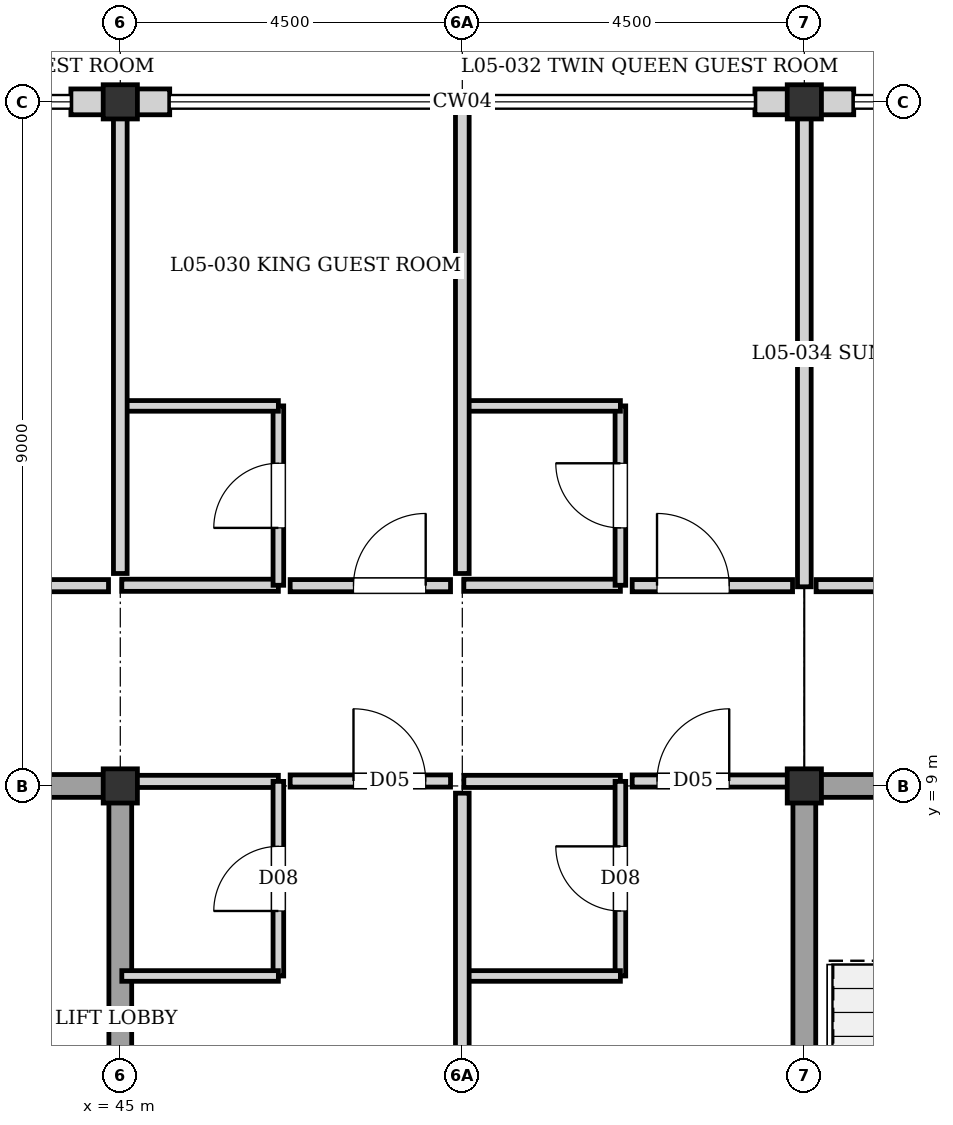
"""IFC4 building model, lengths in metres.
Left out: names, types, materials, properties, quantities, classifications, styles, units other than length and angle.
Written with IfcOpenShell. Run it as: python <this file> out.ifc"""

import sys

from ifc_helpers import new_model, si_unit, direction, frame, frame_2d, origin, origin_2d, place, context, subcontext, project, spatial, rectangle, extrude, element, fill, save


model = new_model("IFC4")
c1 = context("Model", 3, precision=1e-05, world=origin(), true_north=direction((0.0, 1.0)))
c2 = subcontext(c1, "Body", "Model", "MODEL_VIEW")
j1 = project(units=[si_unit("LENGTHUNIT", "METRE"), si_unit("PLANEANGLEUNIT", "RADIAN")], contexts=[c1])
p1 = place(None, origin())
s1 = spatial("IfcSite", under=j1, at=p1, CompositionType="ELEMENT")
p2 = place(p1, origin())
s2 = spatial("IfcBuilding", under=s1, at=p2, CompositionType="ELEMENT")
p3 = place(p2, frame((0.0, 0.0, 17.6)))
s3 = spatial("IfcBuildingStorey", under=s2, at=p3, CompositionType="ELEMENT", Elevation=17.6)
for number, where, z_axis, x_axis in (
    (1, (45.0, 9.0, 0.0), (0.0, 0.0, 1.0), (1.0, 0.0, 0.0)),
    (2, (45.0, 18.0, 0.0), (0.0, 0.0, 1.0), (1.0, 0.0, 0.0)),
    (3, (54.0, 9.0, 0.0), (0.0, 0.0, 1.0), (1.0, 0.0, 0.0)),
    (4, (54.0, 18.0, 0.0), (0.0, 0.0, 1.0), (1.0, 0.0, 0.0)),
):
    element("IfcColumn", number, at=place(p3, frame(where, z_axis=z_axis, x_axis=x_axis)), inside=s3, PredefinedType="COLUMN", context=c2, shape_type="SweptSolid", body=[
        extrude(rectangle(XDim=0.45, YDim=0.45, at=origin_2d()), origin(), (0.0, 0.0, 1.0), 3.04),
    ])
p4 = place(p3, frame((44.35, 18.0, 0.0), z_axis=(0.0, 0.0, 1.0), x_axis=(1.0, 0.0, 0.0)))
e5 = element("IfcWall", 5, at=p4, inside=s3, PredefinedType="SOLIDWALL", context=c2, shape_type="SweptSolid", body=[
    extrude(rectangle(XDim=0.65, YDim=0.34, at=frame_2d((0.325, 0.0))), origin(), (0.0, 0.0, 1.0), 2.38),
])
for number, where, z_axis, x_axis in (
    (6, (45.0, 18.0, 0.0), (0.0, 0.0, 1.0), (1.0, 0.0, 0.0)),
    (7, (53.35, 18.0, 0.0), (0.0, 0.0, 1.0), (1.0, 0.0, 0.0)),
):
    element("IfcWall", number, at=place(p3, frame(where, z_axis=z_axis, x_axis=x_axis)), inside=s3, PredefinedType="SOLIDWALL", context=c2, shape_type="SweptSolid", body=[
        extrude(rectangle(XDim=0.65, YDim=0.34, at=frame_2d((0.325, 0.0))), origin(), (0.0, 0.0, 1.0), 2.55),
    ])
p5 = place(p3, frame((54.0, 18.0, 0.0), z_axis=(0.0, 0.0, 1.0), x_axis=(1.0, 0.0, 0.0)))
e8 = element("IfcWall", 8, at=p5, inside=s3, PredefinedType="SOLIDWALL", context=c2, shape_type="SweptSolid", body=[
    extrude(rectangle(XDim=0.65, YDim=0.34, at=frame_2d((0.325, 0.0))), origin(), (0.0, 0.0, 1.0), 2.48),
])
p6 = place(p3, frame((45.0, 0.0, 0.0), z_axis=(0.0, 0.0, 1.0), x_axis=(0.0, 1.0, 0.0)))
e9 = element("IfcWall", 9, at=p6, inside=s3, PredefinedType="SHEAR", context=c2, shape_type="SweptSolid", body=[
    extrude(rectangle(XDim=9.0, YDim=0.3, at=frame_2d((4.5, 0.0))), origin(), (0.0, 0.0, 1.0), 2.82),
])
p7 = place(p3, frame((36.0, 9.0, 0.0), z_axis=(0.0, 0.0, 1.0), x_axis=(1.0, 0.0, 0.0)))
e10 = element("IfcWall", 10, at=p7, inside=s3, PredefinedType="SHEAR", context=c2, shape_type="SweptSolid", body=[
    extrude(rectangle(XDim=9.0, YDim=0.3, at=frame_2d((4.5, 0.0))), origin(), (0.0, 0.0, 1.0), 2.82),
])
p8 = place(p7, frame((5.95, 0.0, 0.0)))
e11 = element("IfcOpeningElement", 11, at=p8, cuts=e10, PredefinedType="OPENING", context=c2, shape_type="SweptSolid", body=[
    extrude(rectangle(XDim=1.6, YDim=2.1, at=frame_2d((0.8, 1.05))), frame((0.0, 0.16, 0.0), z_axis=(0.0, -1.0, 0.0), x_axis=(1.0, 0.0, 0.0)), (0.0, 0.0, 1.0), 0.32),
])
p9 = place(p3, frame((54.0, 9.0, 0.0), z_axis=(0.0, 0.0, 1.0), x_axis=(1.0, 0.0, 0.0)))
e12 = element("IfcWall", 12, at=p9, inside=s3, PredefinedType="SHEAR", context=c2, shape_type="SweptSolid", body=[
    extrude(rectangle(XDim=9.0, YDim=0.3, at=frame_2d((4.5, 0.0))), origin(), (0.0, 0.0, 1.0), 2.82),
])
p10 = place(p9, frame((6.05, 0.0, 0.0)))
e13 = element("IfcOpeningElement", 13, at=p10, cuts=e12, PredefinedType="OPENING", context=c2, shape_type="SweptSolid", body=[
    extrude(rectangle(XDim=1.4, YDim=2.02, at=frame_2d((0.7, 1.01))), frame((0.0, 0.16, 0.0), z_axis=(0.0, -1.0, 0.0), x_axis=(1.0, 0.0, 0.0)), (0.0, 0.0, 1.0), 0.32),
])
p11 = place(p3, frame((54.0, 0.0, 0.0), z_axis=(0.0, 0.0, 1.0), x_axis=(0.0, 1.0, 0.0)))
e14 = element("IfcWall", 14, at=p11, inside=s3, PredefinedType="SHEAR", context=c2, shape_type="SweptSolid", body=[
    extrude(rectangle(XDim=9.0, YDim=0.3, at=frame_2d((4.5, 0.0))), origin(), (0.0, 0.0, 1.0), 2.82),
])
p12 = place(p3, frame((45.02, 9.06, 0.0), z_axis=(0.0, 0.0, 1.0), x_axis=(1.0, 0.0, 0.0)))
e15 = element("IfcWall", 15, at=p12, inside=s3, PredefinedType="PARTITIONING", context=c2, shape_type="SweptSolid", body=[
    extrude(rectangle(XDim=2.06, YDim=0.16, at=frame_2d((1.03, 0.0))), origin(), (0.0, 0.0, 1.0), 2.38),
])
p13 = place(p3, frame((47.08, 6.5, 0.0), z_axis=(0.0, 0.0, 1.0), x_axis=(0.0, 1.0, 0.0)))
e16 = element("IfcWall", 16, at=p13, inside=s3, PredefinedType="PLUMBINGWALL", context=c2, shape_type="SweptSolid", body=[
    extrude(rectangle(XDim=2.56, YDim=0.14, at=frame_2d((1.28, 0.0))), origin(), (0.0, 0.0, 1.0), 2.82),
])
p14 = place(p13, frame((0.855, 0.0, 0.0)))
e17 = element("IfcOpeningElement", 17, at=p14, cuts=e16, PredefinedType="OPENING", context=c2, shape_type="SweptSolid", body=[
    extrude(rectangle(XDim=0.85, YDim=2.04, at=frame_2d((0.425, 1.02))), frame((0.0, 0.08, 0.0), z_axis=(0.0, -1.0, 0.0), x_axis=(1.0, 0.0, 0.0)), (0.0, 0.0, 1.0), 0.16),
])
p15 = place(p3, frame((45.02, 6.5, 0.0), z_axis=(0.0, 0.0, 1.0), x_axis=(1.0, 0.0, 0.0)))
e18 = element("IfcWall", 18, at=p15, inside=s3, PredefinedType="PLUMBINGWALL", context=c2, shape_type="SweptSolid", body=[
    extrude(rectangle(XDim=2.06, YDim=0.14, at=frame_2d((1.03, 0.0))), origin(), (0.0, 0.0, 1.0), 2.82),
])
p16 = place(p3, frame((49.52, 9.06, 0.0), z_axis=(0.0, 0.0, 1.0), x_axis=(1.0, 0.0, 0.0)))
e19 = element("IfcWall", 19, at=p16, inside=s3, PredefinedType="PARTITIONING", context=c2, shape_type="SweptSolid", body=[
    extrude(rectangle(XDim=2.06, YDim=0.16, at=frame_2d((1.03, 0.0))), origin(), (0.0, 0.0, 1.0), 2.38),
])
p17 = place(p3, frame((51.58, 6.5, 0.0), z_axis=(0.0, 0.0, 1.0), x_axis=(0.0, 1.0, 0.0)))
e20 = element("IfcWall", 20, at=p17, inside=s3, PredefinedType="PLUMBINGWALL", context=c2, shape_type="SweptSolid", body=[
    extrude(rectangle(XDim=2.56, YDim=0.14, at=frame_2d((1.28, 0.0))), origin(), (0.0, 0.0, 1.0), 2.82),
])
p18 = place(p17, frame((0.855, 0.0, 0.0)))
e21 = element("IfcOpeningElement", 21, at=p18, cuts=e20, PredefinedType="OPENING", context=c2, shape_type="SweptSolid", body=[
    extrude(rectangle(XDim=0.85, YDim=2.04, at=frame_2d((0.425, 1.02))), frame((0.0, 0.08, 0.0), z_axis=(0.0, -1.0, 0.0), x_axis=(1.0, 0.0, 0.0)), (0.0, 0.0, 1.0), 0.16),
])
p19 = place(p3, frame((49.52, 6.5, 0.0), z_axis=(0.0, 0.0, 1.0), x_axis=(1.0, 0.0, 0.0)))
e22 = element("IfcWall", 22, at=p19, inside=s3, PredefinedType="PLUMBINGWALL", context=c2, shape_type="SweptSolid", body=[
    extrude(rectangle(XDim=2.06, YDim=0.14, at=frame_2d((1.03, 0.0))), origin(), (0.0, 0.0, 1.0), 2.82),
])
p20 = place(p3, frame((45.02, 11.64, 0.0), z_axis=(0.0, 0.0, 1.0), x_axis=(1.0, 0.0, 0.0)))
e23 = element("IfcWall", 23, at=p20, inside=s3, PredefinedType="PARTITIONING", context=c2, shape_type="SweptSolid", body=[
    extrude(rectangle(XDim=2.06, YDim=0.16, at=frame_2d((1.03, 0.0))), origin(), (0.0, 0.0, 1.0), 2.82),
])
p21 = place(p3, frame((47.08, 11.64, 0.0), z_axis=(0.0, 0.0, 1.0), x_axis=(0.0, 1.0, 0.0)))
e24 = element("IfcWall", 24, at=p21, inside=s3, PredefinedType="PLUMBINGWALL", context=c2, shape_type="SweptSolid", body=[
    extrude(rectangle(XDim=2.36, YDim=0.14, at=frame_2d((1.18, 0.0))), origin(), (0.0, 0.0, 1.0), 2.82),
])
p22 = place(p21, frame((0.755, 0.0, 0.0)))
e25 = element("IfcOpeningElement", 25, at=p22, cuts=e24, PredefinedType="OPENING", context=c2, shape_type="SweptSolid", body=[
    extrude(rectangle(XDim=0.85, YDim=2.04, at=frame_2d((0.425, 1.02))), frame((0.0, 0.08, 0.0), z_axis=(0.0, -1.0, 0.0), x_axis=(1.0, 0.0, 0.0)), (0.0, 0.0, 1.0), 0.16),
])
p23 = place(p3, frame((45.02, 14.0, 0.0), z_axis=(0.0, 0.0, 1.0), x_axis=(1.0, 0.0, 0.0)))
e26 = element("IfcWall", 26, at=p23, inside=s3, PredefinedType="PLUMBINGWALL", context=c2, shape_type="SweptSolid", body=[
    extrude(rectangle(XDim=2.06, YDim=0.14, at=frame_2d((1.03, 0.0))), origin(), (0.0, 0.0, 1.0), 2.82),
])
p24 = place(p3, frame((49.52, 11.64, 0.0), z_axis=(0.0, 0.0, 1.0), x_axis=(1.0, 0.0, 0.0)))
e27 = element("IfcWall", 27, at=p24, inside=s3, PredefinedType="PARTITIONING", context=c2, shape_type="SweptSolid", body=[
    extrude(rectangle(XDim=2.06, YDim=0.16, at=frame_2d((1.03, 0.0))), origin(), (0.0, 0.0, 1.0), 2.82),
])
p25 = place(p3, frame((51.58, 11.64, 0.0), z_axis=(0.0, 0.0, 1.0), x_axis=(0.0, 1.0, 0.0)))
e28 = element("IfcWall", 28, at=p25, inside=s3, PredefinedType="PLUMBINGWALL", context=c2, shape_type="SweptSolid", body=[
    extrude(rectangle(XDim=2.36, YDim=0.14, at=frame_2d((1.18, 0.0))), origin(), (0.0, 0.0, 1.0), 2.82),
])
p26 = place(p25, frame((0.755, 0.0, 0.0)))
e29 = element("IfcOpeningElement", 29, at=p26, cuts=e28, PredefinedType="OPENING", context=c2, shape_type="SweptSolid", body=[
    extrude(rectangle(XDim=0.85, YDim=2.04, at=frame_2d((0.425, 1.02))), frame((0.0, 0.08, 0.0), z_axis=(0.0, -1.0, 0.0), x_axis=(1.0, 0.0, 0.0)), (0.0, 0.0, 1.0), 0.16),
])
p27 = place(p3, frame((49.52, 14.0, 0.0), z_axis=(0.0, 0.0, 1.0), x_axis=(1.0, 0.0, 0.0)))
e30 = element("IfcWall", 30, at=p27, inside=s3, PredefinedType="PLUMBINGWALL", context=c2, shape_type="SweptSolid", body=[
    extrude(rectangle(XDim=2.06, YDim=0.14, at=frame_2d((1.03, 0.0))), origin(), (0.0, 0.0, 1.0), 2.82),
])
p28 = place(p3, frame((49.5, 0.195, 0.0), z_axis=(0.0, 0.0, 1.0), x_axis=(0.0, 1.0, 0.0)))
e31 = element("IfcWall", 31, at=p28, inside=s3, PredefinedType="PARTITIONING", context=c2, shape_type="SweptSolid", body=[
    extrude(rectangle(XDim=8.71, YDim=0.18, at=frame_2d((4.355, 0.0))), origin(), (0.0, 0.0, 1.0), 2.82),
])
p29 = place(p3, frame((45.0, 11.795, 0.0), z_axis=(0.0, 0.0, 1.0), x_axis=(0.0, 1.0, 0.0)))
e32 = element("IfcWall", 32, at=p29, inside=s3, PredefinedType="PARTITIONING", context=c2, shape_type="SweptSolid", body=[
    extrude(rectangle(XDim=6.03, YDim=0.18, at=frame_2d((3.015, 0.0))), origin(), (0.0, 0.0, 1.0), 2.09),
])
p30 = place(p3, frame((49.5, 11.795, 0.0), z_axis=(0.0, 0.0, 1.0), x_axis=(0.0, 1.0, 0.0)))
e33 = element("IfcWall", 33, at=p30, inside=s3, PredefinedType="PARTITIONING", context=c2, shape_type="SweptSolid", body=[
    extrude(rectangle(XDim=6.11, YDim=0.18, at=frame_2d((3.055, 0.0))), origin(), (0.0, 0.0, 1.0), 2.82),
])
p31 = place(p3, frame((54.0, 11.62, 0.0), z_axis=(0.0, 0.0, 1.0), x_axis=(0.0, 1.0, 0.0)))
e34 = element("IfcWall", 34, at=p31, inside=s3, PredefinedType="PARTITIONING", context=c2, shape_type="SweptSolid", body=[
    extrude(rectangle(XDim=6.205, YDim=0.18, at=frame_2d((3.103, 0.0))), origin(), (0.0, 0.0, 1.0), 2.48),
])
p32 = place(p3, frame((47.235, 9.065, 0.0), z_axis=(0.0, 0.0, 1.0), x_axis=(1.0, 0.0, 0.0)))
e35 = element("IfcWall", 35, at=p32, inside=s3, PredefinedType="PARTITIONING", context=c2, shape_type="SweptSolid", body=[
    extrude(rectangle(XDim=2.11, YDim=0.16, at=frame_2d((1.055, 0.0))), origin(), (0.0, 0.0, 1.0), 2.38),
])
p33 = place(p32, frame((0.833, 0.0, 0.0)))
e36 = element("IfcOpeningElement", 36, at=p33, cuts=e35, PredefinedType="OPENING", context=c2, shape_type="SweptSolid", body=[
    extrude(rectangle(XDim=0.95, YDim=2.15, at=frame_2d((0.475, 1.075))), frame((0.0, 0.09, 0.0), z_axis=(0.0, -1.0, 0.0), x_axis=(1.0, 0.0, 0.0)), (0.0, 0.0, 1.0), 0.18),
])
p34 = place(p3, frame((51.735, 9.065, 0.0), z_axis=(0.0, 0.0, 1.0), x_axis=(1.0, 0.0, 0.0)))
e37 = element("IfcWall", 37, at=p34, inside=s3, PredefinedType="PARTITIONING", context=c2, shape_type="SweptSolid", body=[
    extrude(rectangle(XDim=2.11, YDim=0.16, at=frame_2d((1.055, 0.0))), origin(), (0.0, 0.0, 1.0), 2.38),
])
p35 = place(p34, frame((0.327, 0.0, 0.0)))
e38 = element("IfcOpeningElement", 38, at=p35, cuts=e37, PredefinedType="OPENING", context=c2, shape_type="SweptSolid", body=[
    extrude(rectangle(XDim=0.95, YDim=2.15, at=frame_2d((0.475, 1.075))), frame((0.0, 0.09, 0.0), z_axis=(0.0, -1.0, 0.0), x_axis=(1.0, 0.0, 0.0)), (0.0, 0.0, 1.0), 0.18),
])
p36 = place(p3, frame((42.735, 11.635, 0.0), z_axis=(0.0, 0.0, 1.0), x_axis=(1.0, 0.0, 0.0)))
e39 = element("IfcWall", 39, at=p36, inside=s3, PredefinedType="PARTITIONING", context=c2, shape_type="SweptSolid", body=[
    extrude(rectangle(XDim=2.11, YDim=0.16, at=frame_2d((1.055, 0.0))), origin(), (0.0, 0.0, 1.0), 2.82),
])
p37 = place(p36, frame((0.327, 0.0, 0.0)))
e40 = element("IfcOpeningElement", 40, at=p37, cuts=e39, PredefinedType="OPENING", context=c2, shape_type="SweptSolid", body=[
    extrude(rectangle(XDim=0.95, YDim=2.15, at=frame_2d((0.475, 1.075))), frame((0.0, 0.09, 0.0), z_axis=(0.0, -1.0, 0.0), x_axis=(1.0, 0.0, 0.0)), (0.0, 0.0, 1.0), 0.18),
])
p38 = place(p3, frame((47.235, 11.635, 0.0), z_axis=(0.0, 0.0, 1.0), x_axis=(1.0, 0.0, 0.0)))
e41 = element("IfcWall", 41, at=p38, inside=s3, PredefinedType="PARTITIONING", context=c2, shape_type="SweptSolid", body=[
    extrude(rectangle(XDim=2.11, YDim=0.16, at=frame_2d((1.055, 0.0))), origin(), (0.0, 0.0, 1.0), 2.82),
])
p39 = place(p38, frame((0.833, 0.0, 0.0)))
e42 = element("IfcOpeningElement", 42, at=p39, cuts=e41, PredefinedType="OPENING", context=c2, shape_type="SweptSolid", body=[
    extrude(rectangle(XDim=0.95, YDim=2.15, at=frame_2d((0.475, 1.075))), frame((0.0, 0.09, 0.0), z_axis=(0.0, -1.0, 0.0), x_axis=(1.0, 0.0, 0.0)), (0.0, 0.0, 1.0), 0.18),
])
p40 = place(p3, frame((51.735, 11.635, 0.0), z_axis=(0.0, 0.0, 1.0), x_axis=(1.0, 0.0, 0.0)))
e43 = element("IfcWall", 43, at=p40, inside=s3, PredefinedType="PARTITIONING", context=c2, shape_type="SweptSolid", body=[
    extrude(rectangle(XDim=2.11, YDim=0.16, at=frame_2d((1.055, 0.0))), origin(), (0.0, 0.0, 1.0), 2.82),
])
p41 = place(p40, frame((0.327, 0.0, 0.0)))
e44 = element("IfcOpeningElement", 44, at=p41, cuts=e43, PredefinedType="OPENING", context=c2, shape_type="SweptSolid", body=[
    extrude(rectangle(XDim=0.95, YDim=2.15, at=frame_2d((0.475, 1.075))), frame((0.0, 0.09, 0.0), z_axis=(0.0, -1.0, 0.0), x_axis=(1.0, 0.0, 0.0)), (0.0, 0.0, 1.0), 0.18),
])
p42 = place(p3, frame((54.155, 11.635, 0.0), z_axis=(0.0, 0.0, 1.0), x_axis=(1.0, 0.0, 0.0)))
e45 = element("IfcWall", 45, at=p42, inside=s3, PredefinedType="PARTITIONING", context=c2, shape_type="SweptSolid", body=[
    extrude(rectangle(XDim=8.67, YDim=0.16, at=frame_2d((4.335, 0.0))), origin(), (0.0, 0.0, 1.0), 2.82),
])
p43 = place(p42, frame((3.835, 0.0, 0.0)))
e46 = element("IfcOpeningElement", 46, at=p43, cuts=e45, PredefinedType="OPENING", context=c2, shape_type="SweptSolid", body=[
    extrude(rectangle(XDim=1.0, YDim=2.1, at=frame_2d((0.5, 1.05))), frame((0.0, 0.09, 0.0), z_axis=(0.0, -1.0, 0.0), x_axis=(1.0, 0.0, 0.0)), (0.0, 0.0, 1.0), 0.18),
])
p44 = place(p14, origin())
e47 = element("IfcDoor", 47, at=p44, inside=s3, OperationType="SINGLE_SWING_LEFT", PredefinedType="DOOR", context=c2, shape_type="SweptSolid", body=[
    extrude(rectangle(XDim=0.85, YDim=2.04, at=frame_2d((0.425, 1.02))), frame((0.0, 0.025, 0.0), z_axis=(0.0, -1.0, 0.0), x_axis=(1.0, 0.0, 0.0)), (0.0, 0.0, 1.0), 0.05),
])
fill(e17, e47)
p45 = place(p18, origin())
e48 = element("IfcDoor", 48, at=p45, inside=s3, OperationType="SINGLE_SWING_RIGHT", PredefinedType="DOOR", context=c2, shape_type="SweptSolid", body=[
    extrude(rectangle(XDim=0.85, YDim=2.04, at=frame_2d((0.425, 1.02))), frame((0.0, 0.025, 0.0), z_axis=(0.0, -1.0, 0.0), x_axis=(1.0, 0.0, 0.0)), (0.0, 0.0, 1.0), 0.05),
])
fill(e21, e48)
p46 = place(p22, origin())
e49 = element("IfcDoor", 49, at=p46, inside=s3, OperationType="SINGLE_SWING_LEFT", PredefinedType="DOOR", context=c2, shape_type="SweptSolid", body=[
    extrude(rectangle(XDim=0.85, YDim=2.04, at=frame_2d((0.425, 1.02))), frame((0.0, 0.025, 0.0), z_axis=(0.0, -1.0, 0.0), x_axis=(1.0, 0.0, 0.0)), (0.0, 0.0, 1.0), 0.05),
])
fill(e25, e49)
p47 = place(p26, origin())
e50 = element("IfcDoor", 50, at=p47, inside=s3, OperationType="SINGLE_SWING_RIGHT", PredefinedType="DOOR", context=c2, shape_type="SweptSolid", body=[
    extrude(rectangle(XDim=0.85, YDim=2.04, at=frame_2d((0.425, 1.02))), frame((0.0, 0.025, 0.0), z_axis=(0.0, -1.0, 0.0), x_axis=(1.0, 0.0, 0.0)), (0.0, 0.0, 1.0), 0.05),
])
fill(e29, e50)
p48 = place(p33, origin())
e51 = element("IfcDoor", 51, at=p48, inside=s3, OperationType="SINGLE_SWING_LEFT", PredefinedType="DOOR", context=c2, shape_type="SweptSolid", body=[
    extrude(rectangle(XDim=0.95, YDim=2.15, at=frame_2d((0.475, 1.075))), frame((0.0, 0.025, 0.0), z_axis=(0.0, -1.0, 0.0), x_axis=(1.0, 0.0, 0.0)), (0.0, 0.0, 1.0), 0.05),
])
fill(e36, e51)
p49 = place(p35, origin())
e52 = element("IfcDoor", 52, at=p49, inside=s3, OperationType="SINGLE_SWING_RIGHT", PredefinedType="DOOR", context=c2, shape_type="SweptSolid", body=[
    extrude(rectangle(XDim=0.95, YDim=2.15, at=frame_2d((0.475, 1.075))), frame((0.0, 0.025, 0.0), z_axis=(0.0, -1.0, 0.0), x_axis=(1.0, 0.0, 0.0)), (0.0, 0.0, 1.0), 0.05),
])
fill(e38, e52)
p50 = place(p39, origin())
e53 = element("IfcDoor", 53, at=p50, inside=s3, OperationType="SINGLE_SWING_RIGHT", PredefinedType="DOOR", context=c2, shape_type="SweptSolid", body=[
    extrude(rectangle(XDim=0.95, YDim=2.15, at=frame_2d((0.475, 1.075))), frame((0.0, 0.025, 0.0), z_axis=(0.0, -1.0, 0.0), x_axis=(1.0, 0.0, 0.0)), (0.0, 0.0, 1.0), 0.05),
])
fill(e42, e53)
p51 = place(p41, origin())
e54 = element("IfcDoor", 54, at=p51, inside=s3, OperationType="SINGLE_SWING_LEFT", PredefinedType="DOOR", context=c2, shape_type="SweptSolid", body=[
    extrude(rectangle(XDim=0.95, YDim=2.15, at=frame_2d((0.475, 1.075))), frame((0.0, 0.025, 0.0), z_axis=(0.0, -1.0, 0.0), x_axis=(1.0, 0.0, 0.0)), (0.0, 0.0, 1.0), 0.05),
])
fill(e44, e54)
save(model, sys.argv[1])
